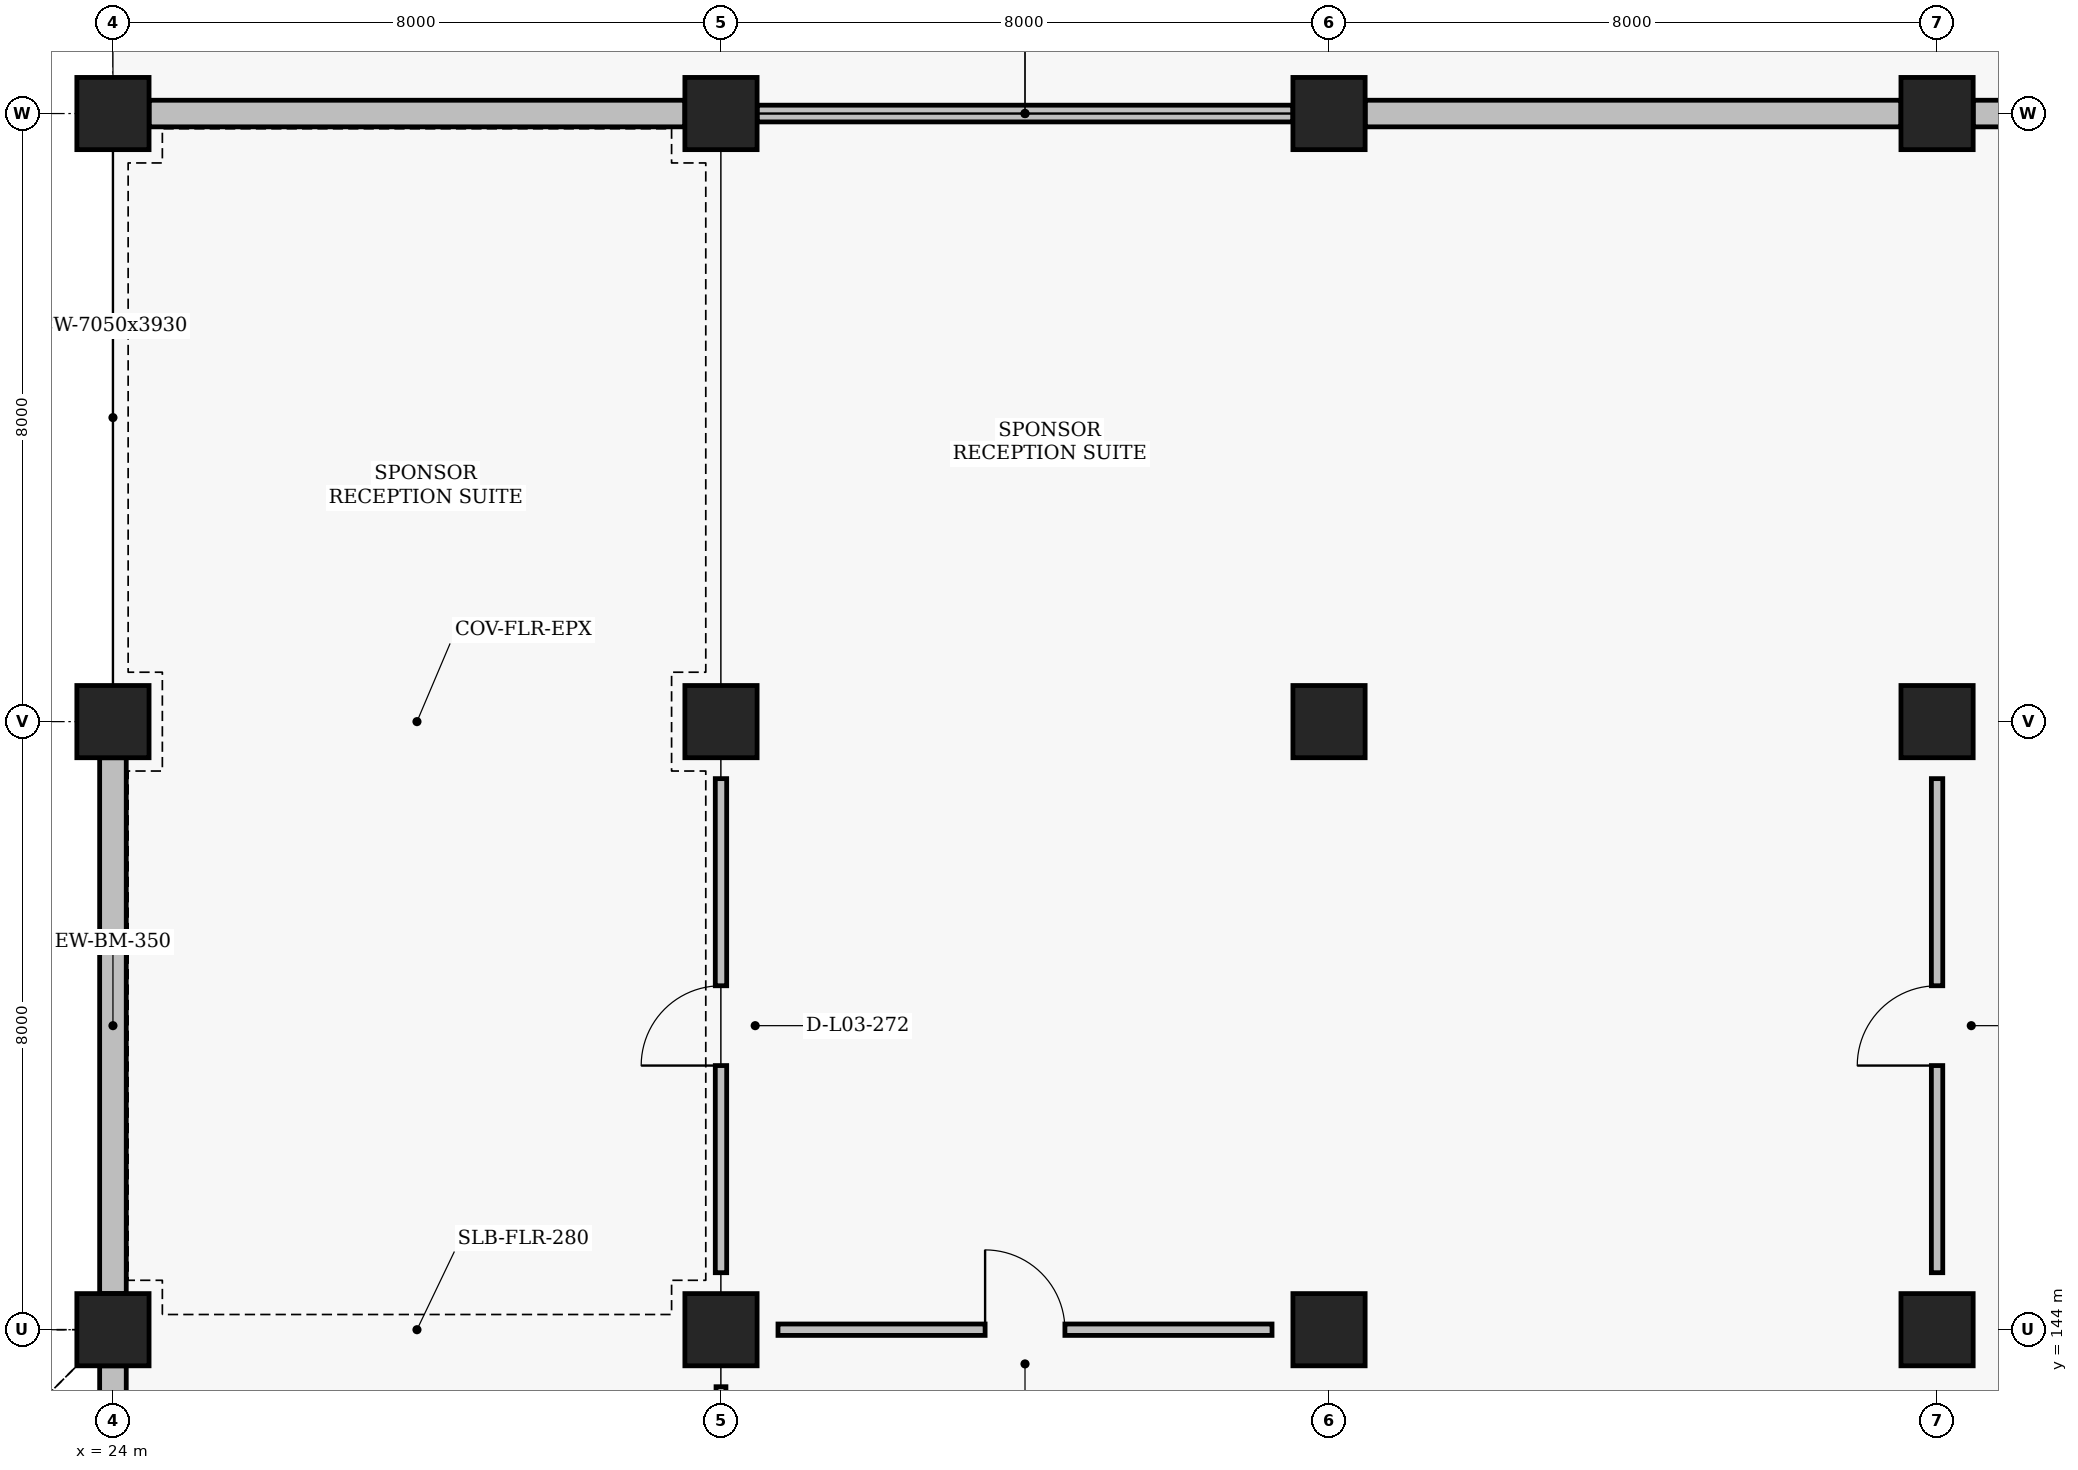
"""IFC4 building model, lengths in metres.
Left out: names, types, materials, properties, quantities, classifications, styles, units other than length and angle.
Written with IfcOpenShell. Run it as: python <this file> out.ifc"""

import sys

from ifc_helpers import new_model, si_unit, direction, frame, frame_2d, origin, origin_2d, place, context, subcontext, project, spatial, rectangle, extrude, element, fill, save


model = new_model("IFC4")
c1 = context("Model", 3, precision=1e-05, world=origin(), true_north=direction((0.0, 1.0)))
c2 = subcontext(c1, "Body", "Model", "MODEL_VIEW")
j1 = project(units=[si_unit("LENGTHUNIT", "METRE"), si_unit("PLANEANGLEUNIT", "RADIAN")], contexts=[c1])
p1 = place(None, origin())
s1 = spatial("IfcSite", under=j1, at=p1, CompositionType="ELEMENT")
p2 = place(p1, origin())
s2 = spatial("IfcBuilding", under=s1, at=p2, CompositionType="ELEMENT")
p3 = place(p2, frame((0.0, 0.0, 9.6)))
s3 = spatial("IfcBuildingStorey", under=s2, at=p3, CompositionType="ELEMENT", Elevation=9.6)
for number, where, z_axis, x_axis in (
    (1, (24.0, 144.0, 0.0), (0.0, 0.0, 1.0), (1.0, 0.0, 0.0)),
    (2, (24.0, 152.0, 0.0), (0.0, 0.0, 1.0), (1.0, 0.0, 0.0)),
    (3, (24.0, 160.0, 0.0), (0.0, 0.0, 1.0), (1.0, 0.0, 0.0)),
    (4, (32.0, 144.0, 0.0), (0.0, 0.0, 1.0), (1.0, 0.0, 0.0)),
    (5, (32.0, 152.0, 0.0), (0.0, 0.0, 1.0), (1.0, 0.0, 0.0)),
    (6, (32.0, 160.0, 0.0), (0.0, 0.0, 1.0), (1.0, 0.0, 0.0)),
    (7, (40.0, 144.0, 0.0), (0.0, 0.0, 1.0), (1.0, 0.0, 0.0)),
    (8, (40.0, 152.0, 0.0), (0.0, 0.0, 1.0), (1.0, 0.0, 0.0)),
    (9, (40.0, 160.0, 0.0), (0.0, 0.0, 1.0), (1.0, 0.0, 0.0)),
    (10, (48.0, 144.0, 0.0), (0.0, 0.0, 1.0), (1.0, 0.0, 0.0)),
    (11, (48.0, 152.0, 0.0), (0.0, 0.0, 1.0), (1.0, 0.0, 0.0)),
    (12, (48.0, 160.0, 0.0), (0.0, 0.0, 1.0), (1.0, 0.0, 0.0)),
):
    element("IfcColumn", number, at=place(p3, frame(where, z_axis=z_axis, x_axis=x_axis)), inside=s3, PredefinedType="COLUMN", context=c2, shape_type="SweptSolid", body=[
        extrude(rectangle(XDim=0.95, YDim=0.95, at=origin_2d()), origin(), (0.0, 0.0, 1.0), 4.8),
    ])
for number, where, z_axis, x_axis in (
    (13, (24.0, 136.475, 0.0), (0.0, 0.0, 1.0), (0.0, 1.0, 0.0)),
    (14, (24.0, 144.475, 0.0), (0.0, 0.0, 1.0), (0.0, 1.0, 0.0)),
):
    element("IfcWall", number, at=place(p3, frame(where, z_axis=z_axis, x_axis=x_axis)), inside=s3, PredefinedType="SOLIDWALL", context=c2, shape_type="SweptSolid", body=[
        extrude(rectangle(XDim=7.05, YDim=0.35, at=frame_2d((3.525, 0.0))), origin(), (0.0, 0.0, 1.0), 3.93),
    ])
p4 = place(p3, frame((24.475, 160.0, 0.0), z_axis=(0.0, 0.0, 1.0), x_axis=(1.0, 0.0, 0.0)))
e15 = element("IfcWall", 15, at=p4, inside=s3, PredefinedType="SOLIDWALL", context=c2, shape_type="SweptSolid", body=[
    extrude(rectangle(XDim=7.05, YDim=0.35, at=frame_2d((3.525, 0.0))), origin(), (0.0, 0.0, 1.0), 3.95),
])
p5 = place(p3, frame((32.475, 160.0, 0.0), z_axis=(0.0, 0.0, 1.0), x_axis=(1.0, 0.0, 0.0)))
e16 = element("IfcWall", 16, at=p5, inside=s3, PredefinedType="PARAPET", context=c2, shape_type="SweptSolid", body=[
    extrude(rectangle(XDim=7.05, YDim=0.22, at=frame_2d((3.525, 0.0))), origin(), (0.0, 0.0, 1.0), 0.16),
])
p6 = place(p3, frame((40.475, 160.0, 0.0), z_axis=(0.0, 0.0, 1.0), x_axis=(1.0, 0.0, 0.0)))
e17 = element("IfcWall", 17, at=p6, inside=s3, PredefinedType="SOLIDWALL", context=c2, shape_type="SweptSolid", body=[
    extrude(rectangle(XDim=7.05, YDim=0.35, at=frame_2d((3.525, 0.0))), origin(), (0.0, 0.0, 1.0), 3.95),
])
p7 = place(p3, frame((48.475, 160.0, 0.0), z_axis=(0.0, 0.0, 1.0), x_axis=(1.0, 0.0, 0.0)))
e18 = element("IfcWall", 18, at=p7, inside=s3, PredefinedType="SOLIDWALL", context=c2, shape_type="SweptSolid", body=[
    extrude(rectangle(XDim=7.05, YDim=0.35, at=frame_2d((3.525, 0.0))), origin(), (0.0, 0.0, 1.0), 3.95),
])
p8 = place(p7, frame((2.85, 0.0, 0.95)))
e19 = element("IfcOpeningElement", 19, at=p8, cuts=e18, PredefinedType="OPENING", context=c2, shape_type="SweptSolid", body=[
    extrude(rectangle(XDim=1.35, YDim=1.6, at=frame_2d((0.675, 0.8))), frame((0.0, 0.185, 0.0), z_axis=(0.0, -1.0, 0.0), x_axis=(1.0, 0.0, 0.0)), (0.0, 0.0, 1.0), 0.37),
])
p9 = place(p3, frame((32.0, 144.75, 0.0), z_axis=(0.0, 0.0, 1.0), x_axis=(0.0, 1.0, 0.0)))
e20 = element("IfcWall", 20, at=p9, inside=s3, PredefinedType="PARTITIONING", context=c2, shape_type="SweptSolid", body=[
    extrude(rectangle(XDim=6.5, YDim=0.15, at=frame_2d((3.25, 0.0))), origin(), (0.0, 0.0, 1.0), 3.93),
])
p10 = place(p9, frame((2.725, 0.0, 0.0)))
e21 = element("IfcOpeningElement", 21, at=p10, cuts=e20, PredefinedType="OPENING", context=c2, shape_type="SweptSolid", body=[
    extrude(rectangle(XDim=1.05, YDim=2.15, at=frame_2d((0.525, 1.075))), frame((0.0, 0.085, 0.0), z_axis=(0.0, -1.0, 0.0), x_axis=(1.0, 0.0, 0.0)), (0.0, 0.0, 1.0), 0.17),
])
p11 = place(p3, frame((32.0, 136.75, 0.0), z_axis=(0.0, 0.0, 1.0), x_axis=(0.0, 1.0, 0.0)))
e22 = element("IfcWall", 22, at=p11, inside=s3, PredefinedType="PARTITIONING", context=c2, shape_type="SweptSolid", body=[
    extrude(rectangle(XDim=6.5, YDim=0.13, at=frame_2d((3.25, 0.0))), origin(), (0.0, 0.0, 1.0), 3.93),
])
p12 = place(p11, frame((2.75, 0.0, 0.0)))
e23 = element("IfcOpeningElement", 23, at=p12, cuts=e22, PredefinedType="OPENING", context=c2, shape_type="SweptSolid", body=[
    extrude(rectangle(XDim=1.0, YDim=2.1, at=frame_2d((0.5, 1.05))), frame((0.0, 0.075, 0.0), z_axis=(0.0, -1.0, 0.0), x_axis=(1.0, 0.0, 0.0)), (0.0, 0.0, 1.0), 0.15),
])
p13 = place(p3, frame((32.75, 144.0, 0.0), z_axis=(0.0, 0.0, 1.0), x_axis=(1.0, 0.0, 0.0)))
e24 = element("IfcWall", 24, at=p13, inside=s3, PredefinedType="PARTITIONING", context=c2, shape_type="SweptSolid", body=[
    extrude(rectangle(XDim=6.5, YDim=0.15, at=frame_2d((3.25, 0.0))), origin(), (0.0, 0.0, 1.0), 3.93),
])
p14 = place(p13, frame((2.725, 0.0, 0.0)))
e25 = element("IfcOpeningElement", 25, at=p14, cuts=e24, PredefinedType="OPENING", context=c2, shape_type="SweptSolid", body=[
    extrude(rectangle(XDim=1.05, YDim=2.15, at=frame_2d((0.525, 1.075))), frame((0.0, 0.085, 0.0), z_axis=(0.0, -1.0, 0.0), x_axis=(1.0, 0.0, 0.0)), (0.0, 0.0, 1.0), 0.17),
])
p15 = place(p3, frame((48.0, 144.75, 0.0), z_axis=(0.0, 0.0, 1.0), x_axis=(0.0, 1.0, 0.0)))
e26 = element("IfcWall", 26, at=p15, inside=s3, PredefinedType="PARTITIONING", context=c2, shape_type="SweptSolid", body=[
    extrude(rectangle(XDim=6.5, YDim=0.15, at=frame_2d((3.25, 0.0))), origin(), (0.0, 0.0, 1.0), 3.93),
])
p16 = place(p15, frame((2.725, 0.0, 0.0)))
e27 = element("IfcOpeningElement", 27, at=p16, cuts=e26, PredefinedType="OPENING", context=c2, shape_type="SweptSolid", body=[
    extrude(rectangle(XDim=1.05, YDim=2.15, at=frame_2d((0.525, 1.075))), frame((0.0, 0.085, 0.0), z_axis=(0.0, -1.0, 0.0), x_axis=(1.0, 0.0, 0.0)), (0.0, 0.0, 1.0), 0.17),
])
p17 = place(p10, origin())
e28 = element("IfcDoor", 28, at=p17, inside=s3, OperationType="SINGLE_SWING_LEFT", PredefinedType="DOOR", context=c2, shape_type="SweptSolid", body=[
    extrude(rectangle(XDim=1.05, YDim=2.15, at=frame_2d((0.525, 1.075))), frame((0.0, 0.025, 0.0), z_axis=(0.0, -1.0, 0.0), x_axis=(1.0, 0.0, 0.0)), (0.0, 0.0, 1.0), 0.05),
])
fill(e21, e28)
p18 = place(p14, origin())
e29 = element("IfcDoor", 29, at=p18, inside=s3, OperationType="SINGLE_SWING_LEFT", PredefinedType="DOOR", context=c2, shape_type="SweptSolid", body=[
    extrude(rectangle(XDim=1.05, YDim=2.15, at=frame_2d((0.525, 1.075))), frame((0.0, 0.025, 0.0), z_axis=(0.0, -1.0, 0.0), x_axis=(1.0, 0.0, 0.0)), (0.0, 0.0, 1.0), 0.05),
])
fill(e25, e29)
p19 = place(p16, origin())
e30 = element("IfcDoor", 30, at=p19, inside=s3, OperationType="SINGLE_SWING_LEFT", PredefinedType="DOOR", context=c2, shape_type="SweptSolid", body=[
    extrude(rectangle(XDim=1.05, YDim=2.15, at=frame_2d((0.525, 1.075))), frame((0.0, 0.025, 0.0), z_axis=(0.0, -1.0, 0.0), x_axis=(1.0, 0.0, 0.0)), (0.0, 0.0, 1.0), 0.05),
])
fill(e27, e30)
save(model, sys.argv[1])
